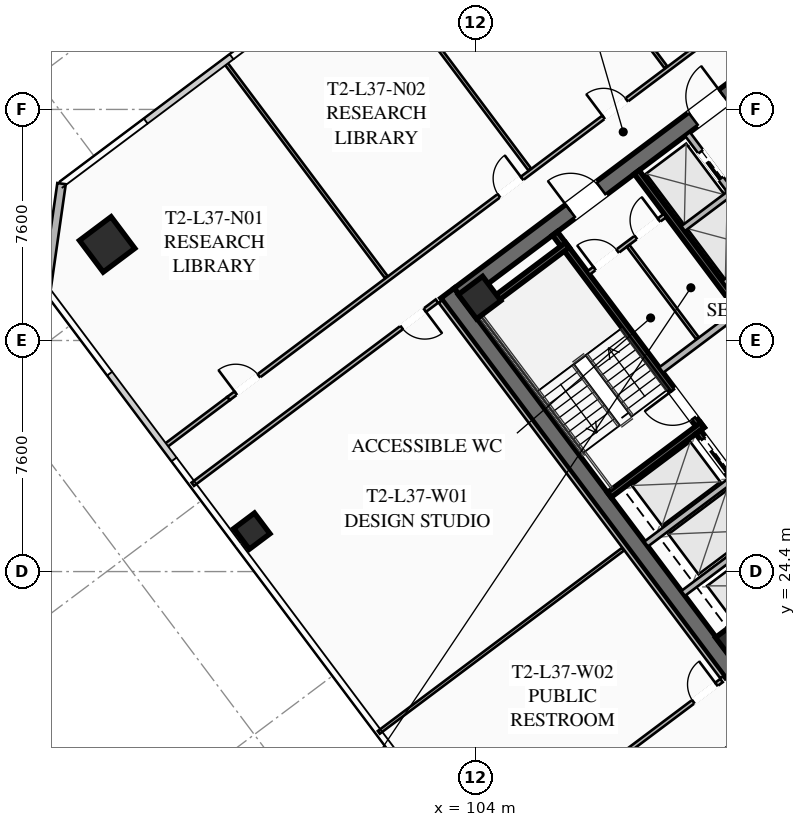
"""IFC4 building model, lengths in metres.
Left out: names, types, materials, properties, quantities, classifications, styles, units other than length and angle.
Written with IfcOpenShell. Run it as: python <this file> out.ifc"""

import sys

from ifc_helpers import new_model, si_unit, direction, frame, frame_2d, origin, origin_2d, place, context, subcontext, project, spatial, rectangle, hollow_rectangle, extrude, element, fill, save


model = new_model("IFC4")
c1 = context("Model", 3, precision=1e-05, world=origin(), true_north=direction((0.0, 1.0)))
c2 = subcontext(c1, "Body", "Model", "MODEL_VIEW")
j1 = project(units=[si_unit("LENGTHUNIT", "METRE"), si_unit("PLANEANGLEUNIT", "RADIAN")], contexts=[c1])
p1 = place(None, origin())
s1 = spatial("IfcSite", under=j1, at=p1, CompositionType="ELEMENT")
p2 = place(p1, origin())
s2 = spatial("IfcBuilding", under=s1, at=p2, CompositionType="ELEMENT")
p3 = place(p2, frame((0.0, 0.0, 139.25)))
s3 = spatial("IfcBuildingStorey", under=s2, at=p3, CompositionType="ELEMENT", Elevation=139.25)
p4 = place(p3, frame((112.436, 21.077, 0.0), z_axis=(0.0, 0.0, 1.0), x_axis=(-0.600005007985, 0.799996243986, 0.0)))
e1 = element("IfcWall", 1, at=p4, inside=s3, PredefinedType="SHEAR", context=c2, shape_type="SweptSolid", body=[
    extrude(rectangle(XDim=15.6, YDim=0.55, at=frame_2d((7.8, 0.0))), origin(), (0.0, 0.0, 1.0), 3.55),
])
p5 = place(p3, frame((103.461, 33.502, 0.0), z_axis=(0.0, 0.0, 1.0), x_axis=(0.799998054672, 0.600002593761, 0.0)))
e2 = element("IfcWall", 2, at=p5, inside=s3, PredefinedType="SHEAR", context=c2, shape_type="SweptSolid", body=[
    extrude(rectangle(XDim=15.06, YDim=0.55, at=frame_2d((7.53, 0.0))), origin(), (0.0, 0.0, 1.0), 3.55),
])
p6 = place(p5, frame((4.58, 0.0, 0.0)))
e3 = element("IfcOpeningElement", 3, at=p6, cuts=e2, PredefinedType="OPENING", context=c2, shape_type="SweptSolid", body=[
    extrude(rectangle(XDim=1.25, YDim=2.25, at=frame_2d((0.625, 1.125))), frame((0.0, 0.285, 0.0), z_axis=(0.0, -1.0, 0.0), x_axis=(1.0, 0.0, 0.0)), (0.0, 0.0, 1.0), 0.57),
])
p7 = place(p5, frame((9.63, 0.0, 0.0)))
e4 = element("IfcOpeningElement", 4, at=p7, cuts=e2, PredefinedType="OPENING", context=c2, shape_type="SweptSolid", body=[
    extrude(rectangle(XDim=1.25, YDim=2.25, at=frame_2d((0.625, 1.125))), frame((0.0, 0.285, 0.0), z_axis=(0.0, -1.0, 0.0), x_axis=(1.0, 0.0, 0.0)), (0.0, 0.0, 1.0), 0.57),
])
for number, where, z_axis, x_axis in (
    (5, (112.59, 22.13, 0.0), (0.0, 0.0, 1.0), (0.8, 0.6, 0.0)),
    (6, (104.13, 33.41, 0.0), (0.0, 0.0, 1.0), (0.8, 0.6, 0.0)),
):
    element("IfcColumn", number, at=place(p3, frame(where, z_axis=z_axis, x_axis=x_axis)), inside=s3, PredefinedType="COLUMN", context=c2, shape_type="SweptSolid", body=[
        extrude(hollow_rectangle(XDim=1.0, YDim=1.0, WallThickness=0.04, at=origin_2d()), origin(), (0.0, 0.0, 1.0), 3.37),
    ])
p8 = place(p3, frame((91.88, 35.16, 0.0), z_axis=(0.0, 0.0, 1.0), x_axis=(0.799999996291, 0.600000004945, 0.0)))
e7 = element("IfcColumn", 7, at=p8, inside=s3, PredefinedType="COLUMN", context=c2, shape_type="SweptSolid", body=[
    extrude(hollow_rectangle(XDim=1.3, YDim=1.3, WallThickness=0.05, at=origin_2d()), origin(), (0.0, 0.0, 1.0), 3.37),
])
p9 = place(p3, frame((96.64, 25.73, 0.0), z_axis=(0.0, 0.0, 1.0), x_axis=(0.799999996291, 0.600000004945, 0.0)))
e8 = element("IfcColumn", 8, at=p9, inside=s3, PredefinedType="COLUMN", context=c2, shape_type="SweptSolid", body=[
    extrude(hollow_rectangle(XDim=0.85, YDim=0.85, WallThickness=0.035, at=origin_2d()), origin(), (0.0, 0.0, 1.0), 3.37),
])
p10 = place(p3, frame((89.88, 33.66, 0.0), z_axis=(0.0, 0.0, 1.0), x_axis=(0.141421356237, 0.989949493661, 0.0)))
e9 = element("IfcWall", 9, at=p10, inside=s3, PredefinedType="SOLIDWALL", context=c2, shape_type="SweptSolid", body=[
    extrude(rectangle(XDim=3.536, YDim=0.28, at=frame_2d((1.768, 0.0))), origin(), (0.0, 0.0, 1.0), 3.37),
])
p11 = place(p3, frame((111.44, 29.08, 0.0), z_axis=(0.0, 0.0, 1.0), x_axis=(-0.59999029481, 0.8000072788, 0.0)))
e10 = element("IfcWall", 10, at=p11, inside=s3, PredefinedType="SHEAR", context=c2, shape_type="SweptSolid", body=[
    extrude(rectangle(XDim=8.05, YDim=0.2, at=frame_2d((4.025, 0.0))), origin(), (0.0, 0.0, 1.0), 3.37),
])
p12 = place(p11, frame((0.45, 0.0, 0.0)))
e11 = element("IfcOpeningElement", 11, at=p12, cuts=e10, PredefinedType="OPENING", context=c2, shape_type="SweptSolid", body=[
    extrude(rectangle(XDim=1.15, YDim=2.2, at=frame_2d((0.575, 1.1))), frame((0.0, 0.11, 0.0), z_axis=(0.0, -1.0, 0.0), x_axis=(1.0, 0.0, 0.0)), (0.0, 0.0, 1.0), 0.22),
])
for number, where, z_axis, x_axis in (
    (12, (108.396, 26.922, 0.0), (0.0, 0.0, 1.0), (0.8, 0.6, 0.0)),
    (13, (103.956, 32.842, 0.0), (0.0, 0.0, 1.0), (0.8, 0.6, 0.0)),
):
    element("IfcWall", number, at=place(p3, frame(where, z_axis=z_axis, x_axis=x_axis)), inside=s3, PredefinedType="SHEAR", context=c2, shape_type="SweptSolid", body=[
        extrude(rectangle(XDim=3.83, YDim=0.2, at=frame_2d((1.915, 0.0))), origin(), (0.0, 0.0, 1.0), 3.37),
    ])
p13 = place(p3, frame((117.998, 25.936, 0.0), z_axis=(0.0, 0.0, 1.0), x_axis=(-0.600002693989, 0.799997979501, 0.0)))
e14 = element("IfcWall", 14, at=p13, inside=s3, PredefinedType="SHEAR", context=c2, shape_type="SweptSolid", body=[
    extrude(rectangle(XDim=14.5, YDim=0.2, at=frame_2d((7.25, 0.0))), origin(), (0.0, 0.0, 1.0), 3.37),
])
p14 = place(p3, frame((110.104, 31.028, 0.0), z_axis=(0.0, 0.0, 1.0), x_axis=(0.800018601094, 0.59997519774, 0.0)))
e15 = element("IfcWall", 15, at=p14, inside=s3, PredefinedType="SOLIDWALL", context=c2, shape_type="SweptSolid", body=[
    extrude(rectangle(XDim=3.15, YDim=0.22, at=frame_2d((1.575, 0.0))), origin(), (0.0, 0.0, 1.0), 2.723),
])
p15 = place(p3, frame((115.19, 23.83, 0.0), z_axis=(0.0, 0.0, 1.0), x_axis=(-0.599993943644, 0.800004542231, 0.0)))
e16 = element("IfcWall", 16, at=p15, inside=s3, PredefinedType="SHEAR", context=c2, shape_type="SweptSolid", body=[
    extrude(rectangle(XDim=6.45, YDim=0.2, at=frame_2d((3.225, 0.0))), origin(), (0.0, 0.0, 1.0), 3.37),
])
p16 = place(p15, frame((4.875, 0.0, 0.0)))
e17 = element("IfcOpeningElement", 17, at=p16, cuts=e16, PredefinedType="OPENING", context=c2, shape_type="SweptSolid", body=[
    extrude(rectangle(XDim=1.3, YDim=2.25, at=frame_2d((0.65, 1.125))), frame((0.0, 0.11, 0.0), z_axis=(0.0, -1.0, 0.0), x_axis=(1.0, 0.0, 0.0)), (0.0, 0.0, 1.0), 0.22),
])
p17 = place(p15, frame((2.875, 0.0, 0.0)))
e18 = element("IfcOpeningElement", 18, at=p17, cuts=e16, PredefinedType="OPENING", context=c2, shape_type="SweptSolid", body=[
    extrude(rectangle(XDim=1.3, YDim=2.25, at=frame_2d((0.65, 1.125))), frame((0.0, 0.11, 0.0), z_axis=(0.0, -1.0, 0.0), x_axis=(1.0, 0.0, 0.0)), (0.0, 0.0, 1.0), 0.22),
])
p18 = place(p15, frame((0.675, 0.0, 0.0)))
e19 = element("IfcOpeningElement", 19, at=p18, cuts=e16, PredefinedType="OPENING", context=c2, shape_type="SweptSolid", body=[
    extrude(rectangle(XDim=1.3, YDim=2.25, at=frame_2d((0.65, 1.125))), frame((0.0, 0.11, 0.0), z_axis=(0.0, -1.0, 0.0), x_axis=(1.0, 0.0, 0.0)), (0.0, 0.0, 1.0), 0.22),
])
for number, where, z_axis, x_axis in (
    (20, (110.826, 23.682, 0.0), (0.0, 0.0, 1.0), (0.8, 0.6, 0.0)),
    (21, (109.608, 25.306, 0.0), (0.0, 0.0, 1.0), (0.8, 0.6, 0.0)),
):
    element("IfcWall", number, at=place(p3, frame(where, z_axis=z_axis, x_axis=x_axis)), inside=s3, PredefinedType="SOLIDWALL", context=c2, shape_type="SweptSolid", body=[
        extrude(rectangle(XDim=3.48, YDim=0.2, at=frame_2d((1.74, 0.0))), origin(), (0.0, 0.0, 1.0), 3.37),
    ])
p19 = place(p3, frame((107.71, 34.22, 0.0), z_axis=(0.0, 0.0, 1.0), x_axis=(0.799981399002, 0.60002480053, 0.0)))
e22 = element("IfcWall", 22, at=p19, inside=s3, PredefinedType="PARTITIONING", context=c2, shape_type="SweptSolid", body=[
    extrude(rectangle(XDim=3.15, YDim=0.135, at=frame_2d((1.575, 0.0))), origin(), (0.0, 0.0, 1.0), 2.723),
])
p20 = place(p19, frame((0.25, 0.0, 0.0)))
e23 = element("IfcOpeningElement", 23, at=p20, cuts=e22, PredefinedType="OPENING", context=c2, shape_type="SweptSolid", body=[
    extrude(rectangle(XDim=0.95, YDim=2.05, at=frame_2d((0.475, 1.025))), frame((0.0, 0.077, 0.0), z_axis=(0.0, -1.0, 0.0), x_axis=(1.0, 0.0, 0.0)), (0.0, 0.0, 1.0), 0.155),
])
p21 = place(p19, frame((1.95, 0.0, 0.0)))
e24 = element("IfcOpeningElement", 24, at=p21, cuts=e22, PredefinedType="OPENING", context=c2, shape_type="SweptSolid", body=[
    extrude(rectangle(XDim=0.95, YDim=2.05, at=frame_2d((0.475, 1.025))), frame((0.0, 0.077, 0.0), z_axis=(0.0, -1.0, 0.0), x_axis=(1.0, 0.0, 0.0)), (0.0, 0.0, 1.0), 0.155),
])
p22 = place(p3, frame((111.296, 32.072, 0.0), z_axis=(0.0, 0.0, 1.0), x_axis=(-0.59995887973, 0.800030838552, 0.0)))
e25 = element("IfcWall", 25, at=p22, inside=s3, PredefinedType="PARTITIONING", context=c2, shape_type="SweptSolid", body=[
    extrude(rectangle(XDim=3.8, YDim=0.11, at=frame_2d((1.9, 0.0))), origin(), (0.0, 0.0, 1.0), 2.723),
])
p23 = place(p3, frame((115.11, 33.27, 0.0), z_axis=(0.0, 0.0, 1.0), x_axis=(-0.600011322243, 0.799991508192, 0.0)))
e26 = element("IfcWall", 26, at=p23, inside=s3, PredefinedType="SOLIDWALL", context=c2, shape_type="SweptSolid", body=[
    extrude(rectangle(XDim=6.9, YDim=0.2, at=frame_2d((3.45, 0.0))), origin(), (0.0, 0.0, 1.0), 3.37),
])
p24 = place(p23, frame((0.575, 0.0, 0.0)))
e27 = element("IfcOpeningElement", 27, at=p24, cuts=e26, PredefinedType="OPENING", context=c2, shape_type="SweptSolid", body=[
    extrude(rectangle(XDim=1.1, YDim=2.2, at=frame_2d((0.55, 1.1))), frame((0.0, 0.11, 0.0), z_axis=(0.0, -1.0, 0.0), x_axis=(1.0, 0.0, 0.0)), (0.0, 0.0, 1.0), 0.22),
])
p25 = place(p23, frame((2.825, 0.0, 0.0)))
e28 = element("IfcOpeningElement", 28, at=p25, cuts=e26, PredefinedType="OPENING", context=c2, shape_type="SweptSolid", body=[
    extrude(rectangle(XDim=1.1, YDim=2.2, at=frame_2d((0.55, 1.1))), frame((0.0, 0.11, 0.0), z_axis=(0.0, -1.0, 0.0), x_axis=(1.0, 0.0, 0.0)), (0.0, 0.0, 1.0), 0.22),
])
p26 = place(p23, frame((5.075, 0.0, 0.0)))
e29 = element("IfcOpeningElement", 29, at=p26, cuts=e26, PredefinedType="OPENING", context=c2, shape_type="SweptSolid", body=[
    extrude(rectangle(XDim=1.1, YDim=2.2, at=frame_2d((0.55, 1.1))), frame((0.0, 0.11, 0.0), z_axis=(0.0, -1.0, 0.0), x_axis=(1.0, 0.0, 0.0)), (0.0, 0.0, 1.0), 0.22),
])
p27 = place(p3, frame((112.176, 33.882, 0.0), z_axis=(0.0, 0.0, 1.0), x_axis=(0.8, 0.6, 0.0)))
e30 = element("IfcWall", 30, at=p27, inside=s3, PredefinedType="SOLIDWALL", context=c2, shape_type="SweptSolid", body=[
    extrude(rectangle(XDim=1.88, YDim=0.2, at=frame_2d((0.94, 0.0))), origin(), (0.0, 0.0, 1.0), 3.37),
])
p28 = place(p3, frame((110.826, 35.682, 0.0), z_axis=(0.0, 0.0, 1.0), x_axis=(0.799984418148, 0.600020775241, 0.0)))
e31 = element("IfcWall", 31, at=p28, inside=s3, PredefinedType="SOLIDWALL", context=c2, shape_type="SweptSolid", body=[
    extrude(rectangle(XDim=1.88, YDim=0.2, at=frame_2d((0.94, 0.0))), origin(), (0.0, 0.0, 1.0), 3.37),
])
p29 = place(p3, frame((95.87, 30.09, 0.0), z_axis=(0.0, 0.0, 1.0), x_axis=(0.799997191971, 0.600003744021, 0.0)))
e32 = element("IfcWall", 32, at=p29, inside=s3, PredefinedType="PARTITIONING", context=c2, shape_type="SweptSolid", body=[
    extrude(rectangle(XDim=31.3, YDim=0.135, at=frame_2d((15.65, 0.0))), origin(), (0.0, 0.0, 1.0), 2.723),
])
p30 = place(p29, frame((0.3, 0.0, 0.0)))
e33 = element("IfcOpeningElement", 33, at=p30, cuts=e32, PredefinedType="OPENING", context=c2, shape_type="SweptSolid", body=[
    extrude(rectangle(XDim=0.95, YDim=2.05, at=frame_2d((0.475, 1.025))), frame((0.0, 0.077, 0.0), z_axis=(0.0, -1.0, 0.0), x_axis=(1.0, 0.0, 0.0)), (0.0, 0.0, 1.0), 0.155),
])
p31 = place(p29, frame((11.12, 0.0, 0.0)))
e34 = element("IfcOpeningElement", 34, at=p31, cuts=e32, PredefinedType="OPENING", context=c2, shape_type="SweptSolid", body=[
    extrude(rectangle(XDim=0.95, YDim=2.05, at=frame_2d((0.475, 1.025))), frame((0.0, 0.077, 0.0), z_axis=(0.0, -1.0, 0.0), x_axis=(1.0, 0.0, 0.0)), (0.0, 0.0, 1.0), 0.155),
])
p32 = place(p29, frame((15.423, 0.0, 0.0)))
e35 = element("IfcOpeningElement", 35, at=p32, cuts=e32, PredefinedType="OPENING", context=c2, shape_type="SweptSolid", body=[
    extrude(rectangle(XDim=0.95, YDim=2.05, at=frame_2d((0.475, 1.025))), frame((0.0, 0.077, 0.0), z_axis=(0.0, -1.0, 0.0), x_axis=(1.0, 0.0, 0.0)), (0.0, 0.0, 1.0), 0.155),
])
p33 = place(p29, frame((19.228, 0.0, 0.0)))
e36 = element("IfcOpeningElement", 36, at=p33, cuts=e32, PredefinedType="OPENING", context=c2, shape_type="SweptSolid", body=[
    extrude(rectangle(XDim=0.95, YDim=2.05, at=frame_2d((0.475, 1.025))), frame((0.0, 0.077, 0.0), z_axis=(0.0, -1.0, 0.0), x_axis=(1.0, 0.0, 0.0)), (0.0, 0.0, 1.0), 0.155),
])
p34 = place(p29, frame((30.05, 0.0, 0.0)))
e37 = element("IfcOpeningElement", 37, at=p34, cuts=e32, PredefinedType="OPENING", context=c2, shape_type="SweptSolid", body=[
    extrude(rectangle(XDim=0.95, YDim=2.05, at=frame_2d((0.475, 1.025))), frame((0.0, 0.077, 0.0), z_axis=(0.0, -1.0, 0.0), x_axis=(1.0, 0.0, 0.0)), (0.0, 0.0, 1.0), 0.155),
])
p35 = place(p3, frame((93.766, 28.512, 0.0), z_axis=(0.0, 0.0, 1.0), x_axis=(0.799977721118, 0.600029704027, 0.0)))
e38 = element("IfcWall", 38, at=p35, inside=s3, PredefinedType="PARTITIONING", context=c2, shape_type="SweptSolid", body=[
    extrude(rectangle(XDim=2.63, YDim=0.135, at=frame_2d((1.315, 0.0))), origin(), (0.0, 0.0, 1.0), 2.723),
])
for number, where, z_axis, x_axis in (
    (39, (101.062, 34.084, 0.0), (0.0, 0.0, 1.0), (-0.6, 0.8, 0.0)),
    (40, (105.782, 37.624, 0.0), (0.0, 0.0, 1.0), (-0.6, 0.8, 0.0)),
    (41, (110.262, 40.984, 0.0), (0.0, 0.0, 1.0), (-0.6, 0.8, 0.0)),
):
    element("IfcWall", number, at=place(p3, frame(where, z_axis=z_axis, x_axis=x_axis)), inside=s3, PredefinedType="PARTITIONING", context=c2, shape_type="SweptSolid", body=[
        extrude(rectangle(XDim=8.85, YDim=0.11, at=frame_2d((4.425, 0.0))), origin(), (0.0, 0.0, 1.0), 2.723),
    ])
p36 = place(p3, frame((132.352, 33.614, 0.0), z_axis=(0.0, 0.0, 1.0), x_axis=(-0.8, -0.6, 0.0)))
e42 = element("IfcWall", 42, at=p36, inside=s3, PredefinedType="PARTITIONING", context=c2, shape_type="SweptSolid", body=[
    extrude(rectangle(XDim=31.3, YDim=0.135, at=frame_2d((15.65, 0.0))), origin(), (0.0, 0.0, 1.0), 2.723),
])
p37 = place(p36, frame((29.97, 0.0, 0.0)))
e43 = element("IfcOpeningElement", 43, at=p37, cuts=e42, PredefinedType="OPENING", context=c2, shape_type="SweptSolid", body=[
    extrude(rectangle(XDim=0.95, YDim=2.05, at=frame_2d((0.475, 1.025))), frame((0.0, 0.077, 0.0), z_axis=(0.0, -1.0, 0.0), x_axis=(1.0, 0.0, 0.0)), (0.0, 0.0, 1.0), 0.155),
])
p38 = place(p36, frame((14.968, 0.0, 0.0)))
e44 = element("IfcOpeningElement", 44, at=p38, cuts=e42, PredefinedType="OPENING", context=c2, shape_type="SweptSolid", body=[
    extrude(rectangle(XDim=0.95, YDim=2.05, at=frame_2d((0.475, 1.025))), frame((0.0, 0.077, 0.0), z_axis=(0.0, -1.0, 0.0), x_axis=(1.0, 0.0, 0.0)), (0.0, 0.0, 1.0), 0.155),
])
p39 = place(p36, frame((0.38, 0.0, 0.0)))
e45 = element("IfcOpeningElement", 45, at=p39, cuts=e42, PredefinedType="OPENING", context=c2, shape_type="SweptSolid", body=[
    extrude(rectangle(XDim=0.95, YDim=2.05, at=frame_2d((0.475, 1.025))), frame((0.0, 0.077, 0.0), z_axis=(0.0, -1.0, 0.0), x_axis=(1.0, 0.0, 0.0)), (0.0, 0.0, 1.0), 0.155),
])
p40 = place(p3, frame((112.104, 20.928, 0.0), z_axis=(0.0, 0.0, 1.0), x_axis=(-0.599994940075, 0.800003794918, 0.0)))
e46 = element("IfcWall", 46, at=p40, inside=s3, PredefinedType="PARTITIONING", context=c2, shape_type="SweptSolid", body=[
    extrude(rectangle(XDim=15.44, YDim=0.135, at=frame_2d((7.72, 0.0))), origin(), (0.0, 0.0, 1.0), 2.723),
])
p41 = place(p3, frame((102.728, 33.296, 0.0), z_axis=(0.0, 0.0, 1.0), x_axis=(-0.800002918023, -0.599996109283, 0.0)))
e47 = element("IfcWall", 47, at=p41, inside=s3, PredefinedType="PARTITIONING", context=c2, shape_type="SweptSolid", body=[
    extrude(rectangle(XDim=10.04, YDim=0.135, at=frame_2d((5.02, 0.0))), origin(), (0.0, 0.0, 1.0), 2.723),
])
p42 = place(p41, frame((0.5, 0.0, 0.0)))
e48 = element("IfcOpeningElement", 48, at=p42, cuts=e47, PredefinedType="OPENING", context=c2, shape_type="SweptSolid", body=[
    extrude(rectangle(XDim=0.95, YDim=2.05, at=frame_2d((0.475, 1.025))), frame((0.0, 0.077, 0.0), z_axis=(0.0, -1.0, 0.0), x_axis=(1.0, 0.0, 0.0)), (0.0, 0.0, 1.0), 0.155),
])
p43 = place(p3, frame((104.056, 14.792, 0.0), z_axis=(0.0, 0.0, 1.0), x_axis=(0.800002918023, 0.599996109283, 0.0)))
e49 = element("IfcWall", 49, at=p43, inside=s3, PredefinedType="PARTITIONING", context=c2, shape_type="SweptSolid", body=[
    extrude(rectangle(XDim=10.04, YDim=0.135, at=frame_2d((5.02, 0.0))), origin(), (0.0, 0.0, 1.0), 2.723),
])
p44 = place(p43, frame((8.88, 0.0, 0.0)))
e50 = element("IfcOpeningElement", 50, at=p44, cuts=e49, PredefinedType="OPENING", context=c2, shape_type="SweptSolid", body=[
    extrude(rectangle(XDim=0.95, YDim=2.05, at=frame_2d((0.475, 1.025))), frame((0.0, 0.077, 0.0), z_axis=(0.0, -1.0, 0.0), x_axis=(1.0, 0.0, 0.0)), (0.0, 0.0, 1.0), 0.155),
])
p45 = place(p3, frame((100.816, 19.112, 0.0), z_axis=(0.0, 0.0, 1.0), x_axis=(0.800002918023, 0.599996109283, 0.0)))
e51 = element("IfcWall", 51, at=p45, inside=s3, PredefinedType="PARTITIONING", context=c2, shape_type="SweptSolid", body=[
    extrude(rectangle(XDim=10.04, YDim=0.11, at=frame_2d((5.02, 0.0))), origin(), (0.0, 0.0, 1.0), 2.723),
])
p46 = place(p6, origin())
e52 = element("IfcDoor", 52, at=p46, inside=s3, OperationType="SINGLE_SWING_LEFT", PredefinedType="DOOR", context=c2, shape_type="SweptSolid", body=[
    extrude(rectangle(XDim=1.25, YDim=2.25, at=frame_2d((0.625, 1.125))), frame((0.0, 0.025, 0.0), z_axis=(0.0, -1.0, 0.0), x_axis=(1.0, 0.0, 0.0)), (0.0, 0.0, 1.0), 0.05),
])
fill(e3, e52)
p47 = place(p7, origin())
e53 = element("IfcDoor", 53, at=p47, inside=s3, OperationType="SINGLE_SWING_RIGHT", PredefinedType="DOOR", context=c2, shape_type="SweptSolid", body=[
    extrude(rectangle(XDim=1.25, YDim=2.25, at=frame_2d((0.625, 1.125))), frame((0.0, 0.025, 0.0), z_axis=(0.0, -1.0, 0.0), x_axis=(1.0, 0.0, 0.0)), (0.0, 0.0, 1.0), 0.05),
])
fill(e4, e53)
p48 = place(p12, origin())
e54 = element("IfcDoor", 54, at=p48, inside=s3, OperationType="SINGLE_SWING_RIGHT", PredefinedType="DOOR", context=c2, shape_type="SweptSolid", body=[
    extrude(rectangle(XDim=1.15, YDim=2.2, at=frame_2d((0.575, 1.1))), frame((0.0, 0.025, 0.0), z_axis=(0.0, -1.0, 0.0), x_axis=(1.0, 0.0, 0.0)), (0.0, 0.0, 1.0), 0.05),
])
fill(e11, e54)
p49 = place(p20, origin())
e55 = element("IfcDoor", 55, at=p49, inside=s3, OperationType="SINGLE_SWING_LEFT", PredefinedType="DOOR", context=c2, shape_type="SweptSolid", body=[
    extrude(rectangle(XDim=0.95, YDim=2.05, at=frame_2d((0.475, 1.025))), frame((0.0, 0.025, 0.0), z_axis=(0.0, -1.0, 0.0), x_axis=(1.0, 0.0, 0.0)), (0.0, 0.0, 1.0), 0.05),
])
fill(e23, e55)
p50 = place(p21, origin())
e56 = element("IfcDoor", 56, at=p50, inside=s3, OperationType="SINGLE_SWING_RIGHT", PredefinedType="DOOR", context=c2, shape_type="SweptSolid", body=[
    extrude(rectangle(XDim=0.95, YDim=2.05, at=frame_2d((0.475, 1.025))), frame((0.0, 0.025, 0.0), z_axis=(0.0, -1.0, 0.0), x_axis=(1.0, 0.0, 0.0)), (0.0, 0.0, 1.0), 0.05),
])
fill(e24, e56)
p51 = place(p30, origin())
e57 = element("IfcDoor", 57, at=p51, inside=s3, OperationType="SINGLE_SWING_LEFT", PredefinedType="DOOR", context=c2, shape_type="SweptSolid", body=[
    extrude(rectangle(XDim=0.95, YDim=2.05, at=frame_2d((0.475, 1.025))), frame((0.0, 0.025, 0.0), z_axis=(0.0, -1.0, 0.0), x_axis=(1.0, 0.0, 0.0)), (0.0, 0.0, 1.0), 0.05),
])
fill(e33, e57)
p52 = place(p31, origin())
e58 = element("IfcDoor", 58, at=p52, inside=s3, OperationType="SINGLE_SWING_RIGHT", PredefinedType="DOOR", context=c2, shape_type="SweptSolid", body=[
    extrude(rectangle(XDim=0.95, YDim=2.05, at=frame_2d((0.475, 1.025))), frame((0.0, 0.025, 0.0), z_axis=(0.0, -1.0, 0.0), x_axis=(1.0, 0.0, 0.0)), (0.0, 0.0, 1.0), 0.05),
])
fill(e34, e58)
p53 = place(p32, origin())
e59 = element("IfcDoor", 59, at=p53, inside=s3, OperationType="SINGLE_SWING_LEFT", PredefinedType="DOOR", context=c2, shape_type="SweptSolid", body=[
    extrude(rectangle(XDim=0.95, YDim=2.05, at=frame_2d((0.475, 1.025))), frame((0.0, 0.025, 0.0), z_axis=(0.0, -1.0, 0.0), x_axis=(1.0, 0.0, 0.0)), (0.0, 0.0, 1.0), 0.05),
])
fill(e35, e59)
p54 = place(p42, origin())
e60 = element("IfcDoor", 60, at=p54, inside=s3, OperationType="SINGLE_SWING_LEFT", PredefinedType="DOOR", context=c2, shape_type="SweptSolid", body=[
    extrude(rectangle(XDim=0.95, YDim=2.05, at=frame_2d((0.475, 1.025))), frame((0.0, 0.025, 0.0), z_axis=(0.0, -1.0, 0.0), x_axis=(1.0, 0.0, 0.0)), (0.0, 0.0, 1.0), 0.05),
])
fill(e48, e60)
p55 = place(p44, origin())
e61 = element("IfcDoor", 61, at=p55, inside=s3, OperationType="SINGLE_SWING_RIGHT", PredefinedType="DOOR", context=c2, shape_type="SweptSolid", body=[
    extrude(rectangle(XDim=0.95, YDim=2.05, at=frame_2d((0.475, 1.025))), frame((0.0, 0.025, 0.0), z_axis=(0.0, -1.0, 0.0), x_axis=(1.0, 0.0, 0.0)), (0.0, 0.0, 1.0), 0.05),
])
fill(e50, e61)
p56 = place(p16, origin())
e62 = element("IfcDoor", 62, at=p56, inside=s3, OperationType="SLIDING_TO_LEFT", PredefinedType="DOOR", context=c2, shape_type="SweptSolid", body=[
    extrude(rectangle(XDim=1.3, YDim=2.25, at=frame_2d((0.65, 1.125))), frame((0.0, 0.025, 0.0), z_axis=(0.0, -1.0, 0.0), x_axis=(1.0, 0.0, 0.0)), (0.0, 0.0, 1.0), 0.05),
])
fill(e17, e62)
p57 = place(p26, origin())
e63 = element("IfcDoor", 63, at=p57, inside=s3, OperationType="SLIDING_TO_LEFT", PredefinedType="DOOR", context=c2, shape_type="SweptSolid", body=[
    extrude(rectangle(XDim=1.1, YDim=2.2, at=frame_2d((0.55, 1.1))), frame((0.0, 0.025, 0.0), z_axis=(0.0, -1.0, 0.0), x_axis=(1.0, 0.0, 0.0)), (0.0, 0.0, 1.0), 0.05),
])
fill(e29, e63)
save(model, sys.argv[1])
